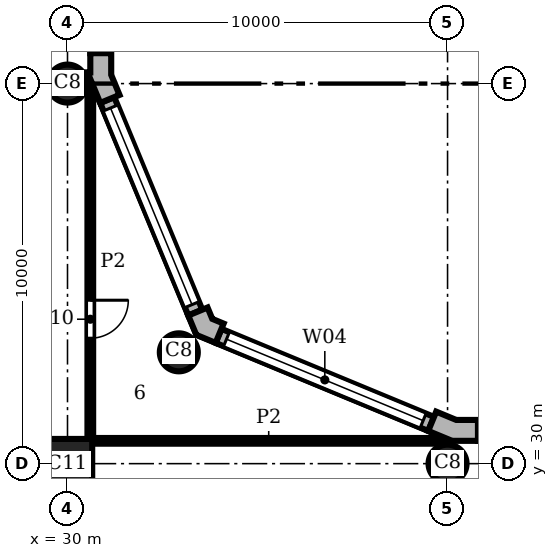
"""IFC4 building model, lengths in metres.
Left out: names, types, materials, properties, quantities, classifications, styles, units other than length and angle.
Written with IfcOpenShell. Run it as: python <this file> out.ifc"""

import sys

from ifc_helpers import new_model, si_unit, direction, frame, frame_2d, origin, origin_2d, place, context, subcontext, project, spatial, polyline, rectangle, circle, outline, extrude, element, fill, save


model = new_model("IFC4")
c1 = context("Model", 3, precision=1e-05, world=origin(), true_north=direction((0.0, 1.0)))
c2 = subcontext(c1, "Body", "Model", "MODEL_VIEW")
j1 = project(units=[si_unit("LENGTHUNIT", "METRE"), si_unit("PLANEANGLEUNIT", "RADIAN")], contexts=[c1])
p1 = place(None, origin())
s1 = spatial("IfcSite", under=j1, at=p1, CompositionType="ELEMENT")
p2 = place(p1, origin())
s2 = spatial("IfcBuilding", under=s1, at=p2, CompositionType="ELEMENT")
p3 = place(p2, frame((0.0, 0.0, 131.7)))
s3 = spatial("IfcBuildingStorey", under=s2, at=p3, CompositionType="ELEMENT", Elevation=131.7)
for number, where, z_axis, x_axis in (
    (1, (40.0, 30.0, 0.0), (0.0, 0.0, 1.0), (1.0, 0.0, 0.0)),
    (2, (32.929, 32.929, 0.0), (0.0, 0.0, 1.0), (1.0, 0.0, 0.0)),
    (3, (30.0, 40.0, 0.0), (0.0, 0.0, 1.0), (1.0, 0.0, 0.0)),
):
    element("IfcColumn", number, at=place(p3, frame(where, z_axis=z_axis, x_axis=x_axis)), inside=s3, PredefinedType="COLUMN", context=c2, shape_type="SweptSolid", body=[
        extrude(circle(Radius=0.5, at=origin_2d()), origin(), (0.0, 0.0, 1.0), 3.9),
    ])
p4 = place(p3, frame((30.0, 30.0, 0.0), z_axis=(0.0, 0.0, 1.0), x_axis=(1.0, 0.0, 0.0)))
e4 = element("IfcColumn", 4, at=p4, inside=s3, PredefinedType="COLUMN", context=c2, shape_type="SweptSolid", body=[
    extrude(rectangle(XDim=1.3, YDim=1.3, at=origin_2d()), origin(), (0.0, 0.0, 1.0), 3.9),
])
p5 = place(p3, origin())
e5 = element("IfcWall", 5, at=p5, inside=s3, PredefinedType="SOLIDWALL", context=c2, shape_type="SweptSolid", body=[
    extrude(outline(polyline([(40.8, 31.0), (40.8, 31.15), (40.229, 31.15), (39.701, 31.369), (39.644, 31.23), (39.49, 30.861), (40.119, 30.6), (40.8, 30.6), (40.8, 31.0)])), origin(), (0.0, 0.0, 1.0), 3.9),
])
e6 = element("IfcWall", 6, at=p5, inside=s3, PredefinedType="SOLIDWALL", context=c2, shape_type="SweptSolid", body=[
    extrude(outline(polyline([(34.051, 33.547), (34.108, 33.685), (33.809, 33.809), (33.685, 34.108), (33.547, 34.051), (33.177, 33.898), (33.388, 33.388), (33.898, 33.177), (34.051, 33.547)])), origin(), (0.0, 0.0, 1.0), 3.9),
])
e7 = element("IfcWall", 7, at=p5, inside=s3, PredefinedType="SOLIDWALL", context=c2, shape_type="SweptSolid", body=[
    extrude(outline(polyline([(30.62, 39.995), (30.62, 40.071), (30.861, 39.49), (31.23, 39.644), (31.369, 39.701), (31.15, 40.229), (31.15, 40.8), (31.0, 40.8), (30.6, 40.8), (30.6, 40.295), (30.5, 40.295), (30.5, 39.995), (30.62, 39.995)])), origin(), (0.0, 0.0, 1.0), 3.9),
])
p6 = place(p3, frame((59.2, 30.8, 0.0), z_axis=(0.0, 0.0, 1.0), x_axis=(-1.0, 0.0, 0.0)))
e8 = element("IfcWall", 8, at=p6, inside=s3, PredefinedType="SOLIDWALL", context=c2, shape_type="SweptSolid", body=[
    extrude(rectangle(XDim=18.4, YDim=0.4, at=frame_2d((9.2, 0.0))), origin(), (0.0, 0.0, 1.0), 3.9),
])
p7 = place(p6, frame((0.2, 0.0, 0.9)))
e9 = element("IfcOpeningElement", 9, at=p7, cuts=e8, PredefinedType="OPENING", context=c2, shape_type="SweptSolid", body=[
    extrude(rectangle(XDim=8.0, YDim=2.35, at=frame_2d((4.0, 1.175))), frame((0.0, 0.21, 0.0), z_axis=(0.0, -1.0, 0.0), x_axis=(1.0, 0.0, 0.0)), (0.0, 0.0, 1.0), 0.42),
])
p8 = place(p6, frame((10.2, 0.0, 0.9)))
e10 = element("IfcOpeningElement", 10, at=p8, cuts=e8, PredefinedType="OPENING", context=c2, shape_type="SweptSolid", body=[
    extrude(rectangle(XDim=8.0, YDim=2.35, at=frame_2d((4.0, 1.175))), frame((0.0, 0.21, 0.0), z_axis=(0.0, -1.0, 0.0), x_axis=(1.0, 0.0, 0.0)), (0.0, 0.0, 1.0), 0.42),
])
p9 = place(p3, frame((39.567, 31.045, 0.0), z_axis=(0.0, 0.0, 1.0), x_axis=(-0.923891000409, 0.382655745237, 0.0)))
e11 = element("IfcWall", 11, at=p9, inside=s3, PredefinedType="SOLIDWALL", context=c2, shape_type="SweptSolid", body=[
    extrude(rectangle(XDim=6.053, YDim=0.4, at=frame_2d((3.027, 0.0))), origin(), (0.0, 0.0, 1.0), 3.9),
])
p10 = place(p9, frame((0.227, 0.0, 0.9)))
e12 = element("IfcOpeningElement", 12, at=p10, cuts=e11, PredefinedType="OPENING", context=c2, shape_type="SweptSolid", body=[
    extrude(rectangle(XDim=5.6, YDim=2.35, at=frame_2d((2.8, 1.175))), frame((0.0, 0.21, 0.0), z_axis=(0.0, -1.0, 0.0), x_axis=(1.0, 0.0, 0.0)), (0.0, 0.0, 1.0), 0.42),
])
p11 = place(p3, frame((33.362, 33.974, 0.0), z_axis=(0.0, 0.0, 1.0), x_axis=(-0.382655745237, 0.923891000409, 0.0)))
e13 = element("IfcWall", 13, at=p11, inside=s3, PredefinedType="SOLIDWALL", context=c2, shape_type="SweptSolid", body=[
    extrude(rectangle(XDim=6.053, YDim=0.4, at=frame_2d((3.027, 0.0))), origin(), (0.0, 0.0, 1.0), 3.9),
])
p12 = place(p11, frame((0.227, 0.0, 0.9)))
e14 = element("IfcOpeningElement", 14, at=p12, cuts=e13, PredefinedType="OPENING", context=c2, shape_type="SweptSolid", body=[
    extrude(rectangle(XDim=5.6, YDim=2.35, at=frame_2d((2.8, 1.175))), frame((0.0, 0.21, 0.0), z_axis=(0.0, -1.0, 0.0), x_axis=(1.0, 0.0, 0.0)), (0.0, 0.0, 1.0), 0.42),
])
p13 = place(p3, frame((30.8, 40.8, 0.0), z_axis=(0.0, 0.0, 1.0), x_axis=(0.0, 1.0, 0.0)))
e15 = element("IfcWall", 15, at=p13, inside=s3, PredefinedType="SOLIDWALL", context=c2, shape_type="SweptSolid", body=[
    extrude(rectangle(XDim=18.4, YDim=0.4, at=frame_2d((9.2, 0.0))), origin(), (0.0, 0.0, 1.0), 3.9),
])
p14 = place(p13, frame((0.2, 0.0, 0.9)))
e16 = element("IfcOpeningElement", 16, at=p14, cuts=e15, PredefinedType="OPENING", context=c2, shape_type="SweptSolid", body=[
    extrude(rectangle(XDim=8.0, YDim=2.35, at=frame_2d((4.0, 1.175))), frame((0.0, 0.21, 0.0), z_axis=(0.0, -1.0, 0.0), x_axis=(1.0, 0.0, 0.0)), (0.0, 0.0, 1.0), 0.42),
])
p15 = place(p13, frame((10.2, 0.0, 0.9)))
e17 = element("IfcOpeningElement", 17, at=p15, cuts=e15, PredefinedType="OPENING", context=c2, shape_type="SweptSolid", body=[
    extrude(rectangle(XDim=8.0, YDim=2.35, at=frame_2d((4.0, 1.175))), frame((0.0, 0.21, 0.0), z_axis=(0.0, -1.0, 0.0), x_axis=(1.0, 0.0, 0.0)), (0.0, 0.0, 1.0), 0.42),
])
p16 = place(p3, frame((30.6, 30.65, 0.0), z_axis=(0.0, 0.0, 1.0), x_axis=(0.0, 1.0, 0.0)))
e18 = element("IfcWall", 18, at=p16, inside=s3, PredefinedType="PARTITIONING", context=c2, shape_type="SweptSolid", body=[
    extrude(rectangle(XDim=9.288, YDim=0.15, at=frame_2d((4.644, 0.0))), origin(), (0.0, 0.0, 1.0), 3.58),
])
p17 = place(p16, frame((2.65, 0.0, 0.0)))
e19 = element("IfcOpeningElement", 19, at=p17, cuts=e18, PredefinedType="OPENING", context=c2, shape_type="SweptSolid", body=[
    extrude(rectangle(XDim=1.0, YDim=2.1, at=frame_2d((0.5, 1.05))), frame((0.0, 0.085, 0.0), z_axis=(0.0, -1.0, 0.0), x_axis=(1.0, 0.0, 0.0)), (0.0, 0.0, 1.0), 0.17),
])
p18 = place(p3, frame((30.65, 30.6, 0.0), z_axis=(0.0, 0.0, 1.0), x_axis=(1.0, 0.0, 0.0)))
e20 = element("IfcWall", 20, at=p18, inside=s3, PredefinedType="PARTITIONING", context=c2, shape_type="SweptSolid", body=[
    extrude(rectangle(XDim=9.288, YDim=0.15, at=frame_2d((4.644, 0.0))), origin(), (0.0, 0.0, 1.0), 3.58),
])
p19 = place(p10, origin())
e21 = element("IfcWindow", 21, at=p19, inside=s3, PartitioningType="SINGLE_PANEL", PredefinedType="WINDOW", context=c2, shape_type="SweptSolid", body=[
    extrude(rectangle(XDim=5.6, YDim=2.35, at=frame_2d((2.8, 1.175))), frame((0.0, 0.16, 0.0), z_axis=(0.0, -1.0, 0.0), x_axis=(1.0, 0.0, 0.0)), (0.0, 0.0, 1.0), 0.06),
])
fill(e12, e21)
p20 = place(p12, origin())
e22 = element("IfcWindow", 22, at=p20, inside=s3, PartitioningType="SINGLE_PANEL", PredefinedType="WINDOW", context=c2, shape_type="SweptSolid", body=[
    extrude(rectangle(XDim=5.6, YDim=2.35, at=frame_2d((2.8, 1.175))), frame((0.0, 0.16, 0.0), z_axis=(0.0, -1.0, 0.0), x_axis=(1.0, 0.0, 0.0)), (0.0, 0.0, 1.0), 0.06),
])
fill(e14, e22)
p21 = place(p17, frame((1.0, 0.0, 0.0), z_axis=(0.0, 0.0, 1.0), x_axis=(-1.0, 0.0, 0.0)))
e23 = element("IfcDoor", 23, at=p21, inside=s3, OperationType="SINGLE_SWING_LEFT", PredefinedType="DOOR", context=c2, shape_type="SweptSolid", body=[
    extrude(rectangle(XDim=1.0, YDim=2.1, at=frame_2d((0.5, 1.05))), frame((0.0, 0.025, 0.0), z_axis=(0.0, -1.0, 0.0), x_axis=(1.0, 0.0, 0.0)), (0.0, 0.0, 1.0), 0.05),
])
fill(e19, e23)
save(model, sys.argv[1])
